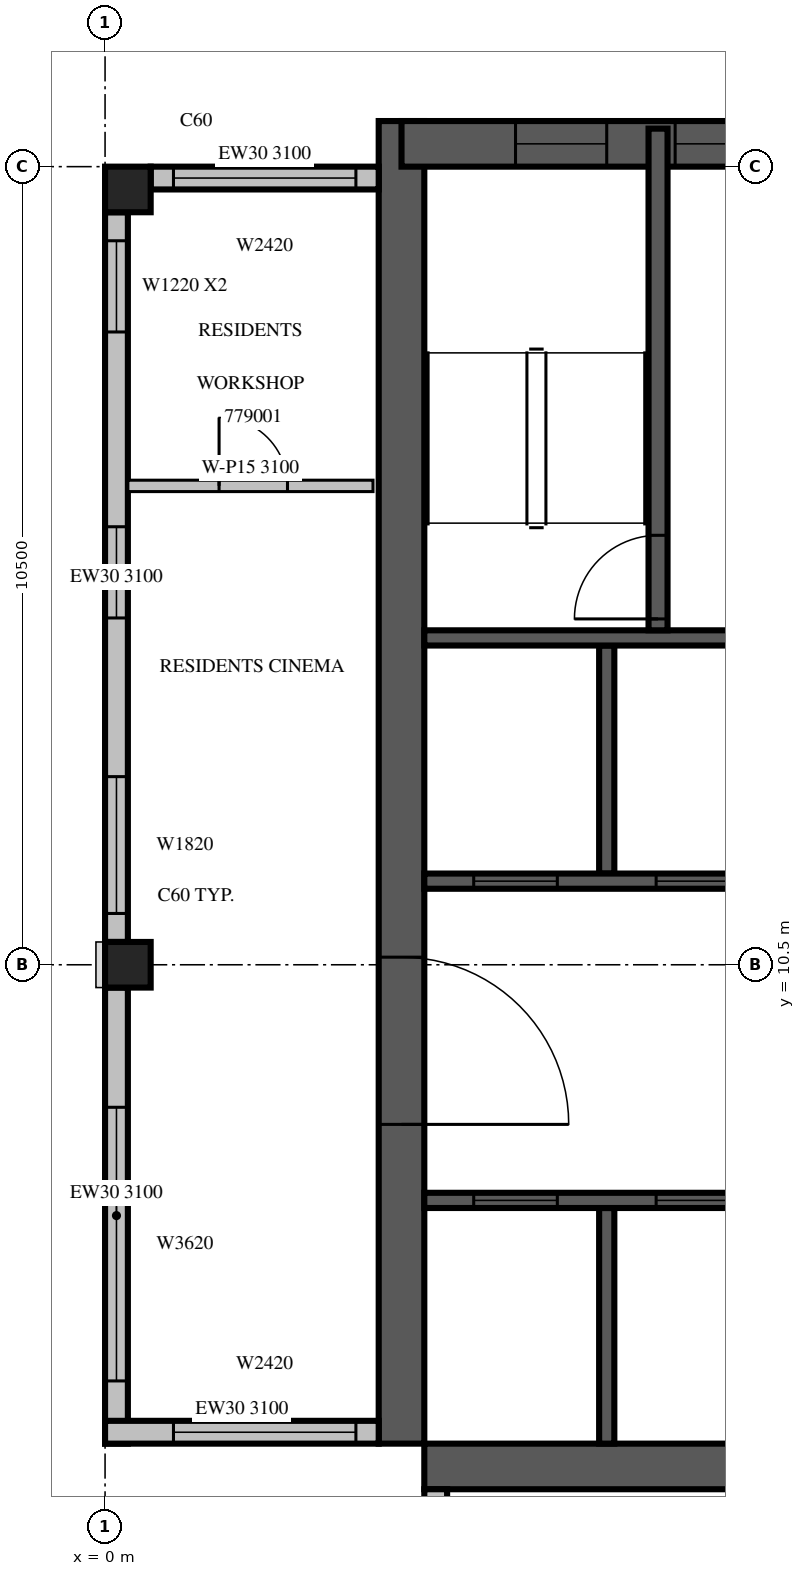
"""IFC4 building model, lengths in metres.
Left out: names, types, materials, properties, quantities, classifications, styles, units other than length and angle.
Written with IfcOpenShell. Run it as: python <this file> out.ifc"""

import sys

from ifc_helpers import new_model, si_unit, direction, frame, frame_2d, origin, origin_2d, place, context, subcontext, project, spatial, rectangle, extrude, source, transform, mapped, element, fill, save


model = new_model("IFC4")
c1 = context("Model", 3, precision=1e-05, world=origin(), true_north=direction((0.0, 1.0)))
c2 = subcontext(c1, "Body", "Model", "MODEL_VIEW")
j1 = project(units=[si_unit("LENGTHUNIT", "METRE"), si_unit("PLANEANGLEUNIT", "RADIAN")], contexts=[c1])
p1 = place(None, origin())
s1 = spatial("IfcSite", under=j1, at=p1, CompositionType="ELEMENT")
p2 = place(p1, origin())
s2 = spatial("IfcBuilding", under=s1, at=p2, CompositionType="ELEMENT")
p3 = place(p2, frame((0.0, 0.0, 337.0)))
s3 = spatial("IfcBuildingStorey", under=s2, at=p3, CompositionType="ELEMENT", Elevation=337.0)
m1 = source(origin(), c2, "Body", "SweptSolid", [
    extrude(rectangle(XDim=0.6, YDim=0.6, at=origin_2d()), origin(), (0.0, 0.0, 1.0), 3.5),
])
for number, where, z_axis, x_axis in (
    (1, (0.3, 10.5, 0.0), (0.0, 0.0, 1.0), (1.0, 0.0, 0.0)),
    (2, (0.3, 20.7, 0.0), (0.0, 0.0, 1.0), (1.0, 0.0, 0.0)),
):
    element("IfcColumn", number, at=place(p3, frame(where, z_axis=z_axis, x_axis=x_axis)), inside=s3, PredefinedType="COLUMN", context=c2, shape_type="MappedRepresentation", body=[
        mapped(m1, transform((0.0, 0.0, 0.0), scale=1.0)),
    ])
m2 = source(origin(), c2, "Body", "SweptSolid", [
    extrude(rectangle(XDim=17.4, YDim=0.6, at=frame_2d((8.7, 0.0))), origin(), (0.0, 0.0, 1.0), 3.5),
])
p4 = place(p3, frame((3.9, 4.2, 0.0), z_axis=(0.0, 0.0, 1.0), x_axis=(0.0, 1.0, 0.0)))
e3 = element("IfcWall", 3, at=p4, inside=s3, PredefinedType="SHEAR", context=c2, shape_type="MappedRepresentation", body=[
    mapped(m2, transform((0.0, 0.0, 0.0), scale=1.0)),
])
m3 = source(origin(), c2, "Body", "SweptSolid", [
    extrude(rectangle(XDim=2.2, YDim=2.1, at=frame_2d((1.1, 1.05))), frame((0.0, 0.31, 0.0), z_axis=(0.0, -1.0, 0.0), x_axis=(1.0, 0.0, 0.0)), (0.0, 0.0, 1.0), 0.62),
])
p5 = place(p4, frame((4.2, 0.0, 0.0)))
e4 = element("IfcOpeningElement", 4, at=p5, cuts=e3, PredefinedType="OPENING", context=c2, shape_type="MappedRepresentation", body=[
    mapped(m3, transform((0.0, 0.0, 0.0), scale=1.0)),
])
p6 = place(p3, frame((4.2, 3.9, 0.0), z_axis=(0.0, 0.0, 1.0), x_axis=(1.0, 0.0, 0.0)))
e5 = element("IfcWall", 5, at=p6, inside=s3, PredefinedType="SHEAR", context=c2, shape_type="MappedRepresentation", body=[
    mapped(m2, transform((0.0, 0.0, 0.0), scale=1.0)),
])
m4 = source(origin(), c2, "Body", "SweptSolid", [
    extrude(rectangle(XDim=0.9, YDim=2.1, at=frame_2d((0.45, 1.05))), frame((0.0, 0.31, 0.0), z_axis=(0.0, -1.0, 0.0), x_axis=(1.0, 0.0, 0.0)), (0.0, 0.0, 1.0), 0.62),
])
p7 = place(p6, frame((15.2, 0.0, 0.0)))
e6 = element("IfcOpeningElement", 6, at=p7, cuts=e5, PredefinedType="OPENING", context=c2, shape_type="MappedRepresentation", body=[
    mapped(m4, transform((0.0, 0.0, 0.0), scale=1.0)),
])
m5 = source(origin(), c2, "Body", "SweptSolid", [
    extrude(rectangle(XDim=6.6, YDim=0.6, at=frame_2d((3.3, 0.0))), origin(), (0.0, 0.0, 1.0), 3.5),
])
p8 = place(p3, frame((3.9, 21.3, 0.0), z_axis=(0.0, 0.0, 1.0), x_axis=(1.0, 0.0, 0.0)))
e7 = element("IfcWall", 7, at=p8, inside=s3, PredefinedType="SHEAR", context=c2, shape_type="MappedRepresentation", body=[
    mapped(m5, transform((0.0, 0.0, 0.0), scale=1.0)),
])
m6 = source(origin(), c2, "Body", "SweptSolid", [
    extrude(rectangle(XDim=1.2, YDim=2.4, at=frame_2d((0.6, 1.2))), frame((0.0, 0.31, 0.0), z_axis=(0.0, -1.0, 0.0), x_axis=(1.0, 0.0, 0.0)), (0.0, 0.0, 1.0), 0.62),
])
p9 = place(p8, frame((1.5, 0.0, 0.6)))
e8 = element("IfcOpeningElement", 8, at=p9, cuts=e7, PredefinedType="OPENING", context=c2, shape_type="MappedRepresentation", body=[
    mapped(m6, transform((0.0, 0.0, 0.0), scale=1.0)),
])
p10 = place(p8, frame((3.6, 0.0, 0.6)))
e9 = element("IfcOpeningElement", 9, at=p10, cuts=e7, PredefinedType="OPENING", context=c2, shape_type="MappedRepresentation", body=[
    mapped(m6, transform((0.0, 0.0, 0.0), scale=1.0)),
])
m7 = source(origin(), c2, "Body", "SweptSolid", [
    extrude(rectangle(XDim=3.0, YDim=0.3, at=frame_2d((1.5, 0.0))), origin(), (0.0, 0.0, 1.0), 3.1),
])
p11 = place(p3, frame((3.6, 20.85, 0.0), z_axis=(0.0, 0.0, 1.0), x_axis=(-1.0, 0.0, 0.0)))
e10 = element("IfcWall", 10, at=p11, inside=s3, PredefinedType="STANDARD", context=c2, shape_type="MappedRepresentation", body=[
    mapped(m7, transform((0.0, 0.0, 0.0), scale=1.0)),
])
m8 = source(origin(), c2, "Body", "SweptSolid", [
    extrude(rectangle(XDim=2.4, YDim=2.0, at=frame_2d((1.2, 1.0))), frame((0.0, 0.16, 0.0), z_axis=(0.0, -1.0, 0.0), x_axis=(1.0, 0.0, 0.0)), (0.0, 0.0, 1.0), 0.32),
])
p12 = place(p11, frame((0.3, 0.0, 0.6)))
e11 = element("IfcOpeningElement", 11, at=p12, cuts=e10, PredefinedType="OPENING", context=c2, shape_type="MappedRepresentation", body=[
    mapped(m8, transform((0.0, 0.0, 0.0), scale=1.0)),
])
m9 = source(origin(), c2, "Body", "SweptSolid", [
    extrude(rectangle(XDim=9.6, YDim=0.3, at=frame_2d((4.8, 0.0))), origin(), (0.0, 0.0, 1.0), 3.1),
])
p13 = place(p3, frame((0.15, 20.4, 0.0), z_axis=(0.0, 0.0, 1.0), x_axis=(0.0, -1.0, 0.0)))
e12 = element("IfcWall", 12, at=p13, inside=s3, PredefinedType="STANDARD", context=c2, shape_type="MappedRepresentation", body=[
    mapped(m9, transform((0.0, 0.0, 0.0), scale=1.0)),
])
m10 = source(origin(), c2, "Body", "SweptSolid", [
    extrude(rectangle(XDim=1.2, YDim=2.0, at=frame_2d((0.6, 1.0))), frame((0.0, 0.16, 0.0), z_axis=(0.0, -1.0, 0.0), x_axis=(1.0, 0.0, 0.0)), (0.0, 0.0, 1.0), 0.32),
])
p14 = place(p13, frame((0.375, 0.0, 0.6)))
e13 = element("IfcOpeningElement", 13, at=p14, cuts=e12, PredefinedType="OPENING", context=c2, shape_type="MappedRepresentation", body=[
    mapped(m10, transform((0.0, 0.0, 0.0), scale=1.0)),
])
m11 = source(origin(), c2, "Body", "SweptSolid", [
    extrude(rectangle(XDim=1.8, YDim=2.0, at=frame_2d((0.9, 1.0))), frame((0.0, 0.16, 0.0), z_axis=(0.0, -1.0, 0.0), x_axis=(1.0, 0.0, 0.0)), (0.0, 0.0, 1.0), 0.32),
])
p15 = place(p13, frame((7.425, 0.0, 0.6)))
e14 = element("IfcOpeningElement", 14, at=p15, cuts=e12, PredefinedType="OPENING", context=c2, shape_type="MappedRepresentation", body=[
    mapped(m11, transform((0.0, 0.0, 0.0), scale=1.0)),
])
p16 = place(p13, frame((4.138, 0.0, 0.6)))
e15 = element("IfcOpeningElement", 15, at=p16, cuts=e12, PredefinedType="OPENING", context=c2, shape_type="MappedRepresentation", body=[
    mapped(m10, transform((0.0, 0.0, 0.0), scale=1.0)),
])
m12 = source(origin(), c2, "Body", "SweptSolid", [
    extrude(rectangle(XDim=6.0, YDim=0.3, at=frame_2d((3.0, 0.0))), origin(), (0.0, 0.0, 1.0), 3.1),
])
p17 = place(p3, frame((0.15, 10.2, 0.0), z_axis=(0.0, 0.0, 1.0), x_axis=(0.0, -1.0, 0.0)))
e16 = element("IfcWall", 16, at=p17, inside=s3, PredefinedType="STANDARD", context=c2, shape_type="MappedRepresentation", body=[
    mapped(m12, transform((0.0, 0.0, 0.0), scale=1.0)),
])
m13 = source(origin(), c2, "Body", "SweptSolid", [
    extrude(rectangle(XDim=3.6, YDim=2.0, at=frame_2d((1.8, 1.0))), frame((0.0, 0.16, 0.0), z_axis=(0.0, -1.0, 0.0), x_axis=(1.0, 0.0, 0.0)), (0.0, 0.0, 1.0), 0.32),
])
p18 = place(p17, frame((1.575, 0.0, 0.6)))
e17 = element("IfcOpeningElement", 17, at=p18, cuts=e16, PredefinedType="OPENING", context=c2, shape_type="MappedRepresentation", body=[
    mapped(m13, transform((0.0, 0.0, 0.0), scale=1.0)),
])
m14 = source(origin(), c2, "Body", "SweptSolid", [
    extrude(rectangle(XDim=3.6, YDim=0.3, at=frame_2d((1.8, 0.0))), origin(), (0.0, 0.0, 1.0), 3.1),
])
p19 = place(p3, frame((0.0, 4.35, 0.0), z_axis=(0.0, 0.0, 1.0), x_axis=(1.0, 0.0, 0.0)))
e18 = element("IfcWall", 18, at=p19, inside=s3, PredefinedType="STANDARD", context=c2, shape_type="MappedRepresentation", body=[
    mapped(m14, transform((0.0, 0.0, 0.0), scale=1.0)),
])
p20 = place(p19, frame((0.9, 0.0, 0.6)))
e19 = element("IfcOpeningElement", 19, at=p20, cuts=e18, PredefinedType="OPENING", context=c2, shape_type="MappedRepresentation", body=[
    mapped(m8, transform((0.0, 0.0, 0.0), scale=1.0)),
])
p21 = place(p3, frame((4.35, 3.6, 0.0), z_axis=(0.0, 0.0, 1.0), x_axis=(0.0, -1.0, 0.0)))
e20 = element("IfcWall", 20, at=p21, inside=s3, PredefinedType="STANDARD", context=c2, shape_type="MappedRepresentation", body=[
    mapped(m14, transform((0.0, 0.0, 0.0), scale=1.0)),
])
p22 = place(p21, frame((0.3, 0.0, 0.6)))
e21 = element("IfcOpeningElement", 21, at=p22, cuts=e20, PredefinedType="OPENING", context=c2, shape_type="MappedRepresentation", body=[
    mapped(m8, transform((0.0, 0.0, 0.0), scale=1.0)),
])
m15 = source(origin(), c2, "Body", "SweptSolid", [
    extrude(rectangle(XDim=3.1, YDim=0.2, at=frame_2d((1.55, 0.0))), origin(), (0.0, 0.0, 1.0), 3.5),
])
p23 = place(p3, frame((6.6, 4.2, 0.0), z_axis=(0.0, 0.0, 1.0), x_axis=(0.0, 1.0, 0.0)))
e22 = element("IfcWall", 22, at=p23, inside=s3, PredefinedType="SOLIDWALL", context=c2, shape_type="MappedRepresentation", body=[
    mapped(m15, transform((0.0, 0.0, 0.0), scale=1.0)),
])
m16 = source(origin(), c2, "Body", "SweptSolid", [
    extrude(rectangle(XDim=3.0, YDim=0.2, at=frame_2d((1.5, 0.0))), origin(), (0.0, 0.0, 1.0), 3.5),
])
p24 = place(p3, frame((6.6, 11.7, 0.0), z_axis=(0.0, 0.0, 1.0), x_axis=(0.0, 1.0, 0.0)))
e23 = element("IfcWall", 23, at=p24, inside=s3, PredefinedType="SOLIDWALL", context=c2, shape_type="MappedRepresentation", body=[
    mapped(m16, transform((0.0, 0.0, 0.0), scale=1.0)),
])
m17 = source(origin(), c2, "Body", "SweptSolid", [
    extrude(rectangle(XDim=9.6, YDim=0.2, at=frame_2d((4.8, 0.0))), origin(), (0.0, 0.0, 1.0), 3.5),
])
p25 = place(p3, frame((4.2, 7.4, 0.0), z_axis=(0.0, 0.0, 1.0), x_axis=(1.0, 0.0, 0.0)))
e24 = element("IfcWall", 24, at=p25, inside=s3, PredefinedType="SOLIDWALL", context=c2, shape_type="MappedRepresentation", body=[
    mapped(m17, transform((0.0, 0.0, 0.0), scale=1.0)),
])
m18 = source(origin(), c2, "Body", "SweptSolid", [
    extrude(rectangle(XDim=1.1, YDim=2.1, at=frame_2d((0.55, 1.05))), frame((0.0, 0.11, 0.0), z_axis=(0.0, -1.0, 0.0), x_axis=(1.0, 0.0, 0.0)), (0.0, 0.0, 1.0), 0.22),
])
p26 = place(p25, frame((0.65, 0.0, 0.0)))
e25 = element("IfcOpeningElement", 25, at=p26, cuts=e24, PredefinedType="OPENING", context=c2, shape_type="MappedRepresentation", body=[
    mapped(m18, transform((0.0, 0.0, 0.0), scale=1.0)),
])
p27 = place(p25, frame((3.05, 0.0, 0.0)))
e26 = element("IfcOpeningElement", 26, at=p27, cuts=e24, PredefinedType="OPENING", context=c2, shape_type="MappedRepresentation", body=[
    mapped(m18, transform((0.0, 0.0, 0.0), scale=1.0)),
])
p28 = place(p25, frame((5.45, 0.0, 0.0)))
e27 = element("IfcOpeningElement", 27, at=p28, cuts=e24, PredefinedType="OPENING", context=c2, shape_type="MappedRepresentation", body=[
    mapped(m18, transform((0.0, 0.0, 0.0), scale=1.0)),
])
p29 = place(p25, frame((7.85, 0.0, 0.0)))
e28 = element("IfcOpeningElement", 28, at=p29, cuts=e24, PredefinedType="OPENING", context=c2, shape_type="MappedRepresentation", body=[
    mapped(m18, transform((0.0, 0.0, 0.0), scale=1.0)),
])
m19 = source(origin(), c2, "Body", "SweptSolid", [
    extrude(rectangle(XDim=4.8, YDim=0.2, at=frame_2d((2.4, 0.0))), origin(), (0.0, 0.0, 1.0), 3.5),
])
p30 = place(p3, frame((4.2, 11.6, 0.0), z_axis=(0.0, 0.0, 1.0), x_axis=(1.0, 0.0, 0.0)))
e29 = element("IfcWall", 29, at=p30, inside=s3, PredefinedType="SOLIDWALL", context=c2, shape_type="MappedRepresentation", body=[
    mapped(m19, transform((0.0, 0.0, 0.0), scale=1.0)),
])
p31 = place(p30, frame((0.65, 0.0, 0.0)))
e30 = element("IfcOpeningElement", 30, at=p31, cuts=e29, PredefinedType="OPENING", context=c2, shape_type="MappedRepresentation", body=[
    mapped(m18, transform((0.0, 0.0, 0.0), scale=1.0)),
])
p32 = place(p30, frame((3.05, 0.0, 0.0)))
e31 = element("IfcOpeningElement", 31, at=p32, cuts=e29, PredefinedType="OPENING", context=c2, shape_type="MappedRepresentation", body=[
    mapped(m18, transform((0.0, 0.0, 0.0), scale=1.0)),
])
p33 = place(p3, frame((4.2, 14.8, 0.0), z_axis=(0.0, 0.0, 1.0), x_axis=(1.0, 0.0, 0.0)))
e32 = element("IfcWall", 32, at=p33, inside=s3, PredefinedType="SOLIDWALL", context=c2, shape_type="MappedRepresentation", body=[
    mapped(m19, transform((0.0, 0.0, 0.0), scale=1.0)),
])
m20 = source(origin(), c2, "Body", "SweptSolid", [
    extrude(rectangle(XDim=6.6, YDim=0.25, at=frame_2d((3.3, 0.0))), origin(), (0.0, 0.0, 1.0), 3.1),
])
p34 = place(p3, frame((7.275, 14.9, 0.0), z_axis=(0.0, 0.0, 1.0), x_axis=(0.0, 1.0, 0.0)))
e33 = element("IfcWall", 33, at=p34, inside=s3, PredefinedType="SOLIDWALL", context=c2, shape_type="MappedRepresentation", body=[
    mapped(m20, transform((0.0, 0.0, 0.0), scale=1.0)),
])
m21 = source(origin(), c2, "Body", "SweptSolid", [
    extrude(rectangle(XDim=1.1, YDim=2.1, at=frame_2d((0.55, 1.05))), frame((0.0, 0.135, 0.0), z_axis=(0.0, -1.0, 0.0), x_axis=(1.0, 0.0, 0.0)), (0.0, 0.0, 1.0), 0.27),
])
p35 = place(p34, frame((0.15, 0.0, 0.0)))
e34 = element("IfcOpeningElement", 34, at=p35, cuts=e33, PredefinedType="OPENING", context=c2, shape_type="MappedRepresentation", body=[
    mapped(m21, transform((0.0, 0.0, 0.0), scale=1.0)),
])
m22 = source(origin(), c2, "Body", "SweptSolid", [
    extrude(rectangle(XDim=3.225, YDim=0.15, at=frame_2d((1.613, 0.0))), origin(), (0.0, 0.0, 1.0), 3.1),
])
p36 = place(p3, frame((0.3, 16.8, 0.0), z_axis=(0.0, 0.0, 1.0), x_axis=(1.0, 0.0, 0.0)))
e35 = element("IfcWall", 35, at=p36, inside=s3, PredefinedType="PARTITIONING", context=c2, shape_type="MappedRepresentation", body=[
    mapped(m22, transform((0.0, 0.0, 0.0), scale=1.0)),
])
m23 = source(origin(), c2, "Body", "SweptSolid", [
    extrude(rectangle(XDim=0.9, YDim=2.1, at=frame_2d((0.45, 1.05))), frame((0.0, 0.085, 0.0), z_axis=(0.0, -1.0, 0.0), x_axis=(1.0, 0.0, 0.0)), (0.0, 0.0, 1.0), 0.17),
])
p37 = place(p36, frame((1.2, 0.0, 0.0)))
e36 = element("IfcOpeningElement", 36, at=p37, cuts=e35, PredefinedType="OPENING", context=c2, shape_type="MappedRepresentation", body=[
    mapped(m23, transform((0.0, 0.0, 0.0), scale=1.0)),
])
m24 = source(origin(), c2, "Body", "SweptSolid", [
    extrude(rectangle(XDim=2.4, YDim=2.0, at=frame_2d((1.2, 1.0))), frame((0.0, 0.03, 0.0), z_axis=(0.0, -1.0, 0.0), x_axis=(1.0, 0.0, 0.0)), (0.0, 0.0, 1.0), 0.06),
])
p38 = place(p12, origin())
e37 = element("IfcWindow", 37, at=p38, inside=s3, PartitioningType="SINGLE_PANEL", PredefinedType="WINDOW", context=c2, shape_type="MappedRepresentation", body=[
    mapped(m24, transform((0.0, 0.0, 0.0), scale=1.0)),
])
fill(e11, e37)
m25 = source(origin(), c2, "Body", "SweptSolid", [
    extrude(rectangle(XDim=1.2, YDim=2.0, at=frame_2d((0.6, 1.0))), frame((0.0, 0.03, 0.0), z_axis=(0.0, -1.0, 0.0), x_axis=(1.0, 0.0, 0.0)), (0.0, 0.0, 1.0), 0.06),
])
p39 = place(p14, origin())
e38 = element("IfcWindow", 38, at=p39, inside=s3, PartitioningType="SINGLE_PANEL", PredefinedType="WINDOW", context=c2, shape_type="MappedRepresentation", body=[
    mapped(m25, transform((0.0, 0.0, 0.0), scale=1.0)),
])
fill(e13, e38)
m26 = source(origin(), c2, "Body", "SweptSolid", [
    extrude(rectangle(XDim=1.8, YDim=2.0, at=frame_2d((0.9, 1.0))), frame((0.0, 0.03, 0.0), z_axis=(0.0, -1.0, 0.0), x_axis=(1.0, 0.0, 0.0)), (0.0, 0.0, 1.0), 0.06),
])
p40 = place(p15, origin())
e39 = element("IfcWindow", 39, at=p40, inside=s3, PartitioningType="SINGLE_PANEL", PredefinedType="WINDOW", context=c2, shape_type="MappedRepresentation", body=[
    mapped(m26, transform((0.0, 0.0, 0.0), scale=1.0)),
])
fill(e14, e39)
m27 = source(origin(), c2, "Body", "SweptSolid", [
    extrude(rectangle(XDim=3.6, YDim=2.0, at=frame_2d((1.8, 1.0))), frame((0.0, 0.03, 0.0), z_axis=(0.0, -1.0, 0.0), x_axis=(1.0, 0.0, 0.0)), (0.0, 0.0, 1.0), 0.06),
])
p41 = place(p18, origin())
e40 = element("IfcWindow", 40, at=p41, inside=s3, PartitioningType="SINGLE_PANEL", PredefinedType="WINDOW", context=c2, shape_type="MappedRepresentation", body=[
    mapped(m27, transform((0.0, 0.0, 0.0), scale=1.0)),
])
fill(e17, e40)
p42 = place(p16, origin())
e41 = element("IfcWindow", 41, at=p42, inside=s3, PartitioningType="SINGLE_PANEL", PredefinedType="WINDOW", context=c2, shape_type="MappedRepresentation", body=[
    mapped(m25, transform((0.0, 0.0, 0.0), scale=1.0)),
])
fill(e15, e41)
p43 = place(p20, origin())
e42 = element("IfcWindow", 42, at=p43, inside=s3, PartitioningType="SINGLE_PANEL", PredefinedType="WINDOW", context=c2, shape_type="MappedRepresentation", body=[
    mapped(m24, transform((0.0, 0.0, 0.0), scale=1.0)),
])
fill(e19, e42)
m28 = source(origin(), c2, "Body", "SweptSolid", [
    extrude(rectangle(XDim=1.1, YDim=2.1, at=frame_2d((0.55, 1.05))), frame((0.0, 0.025, 0.0), z_axis=(0.0, -1.0, 0.0), x_axis=(1.0, 0.0, 0.0)), (0.0, 0.0, 1.0), 0.05),
])
p44 = place(p26, origin())
e43 = element("IfcDoor", 43, at=p44, inside=s3, OperationType="SLIDING_TO_LEFT", PredefinedType="DOOR", context=c2, shape_type="MappedRepresentation", body=[
    mapped(m28, transform((0.0, 0.0, 0.0), scale=1.0)),
])
fill(e25, e43)
p45 = place(p27, origin())
e44 = element("IfcDoor", 44, at=p45, inside=s3, OperationType="SLIDING_TO_LEFT", PredefinedType="DOOR", context=c2, shape_type="MappedRepresentation", body=[
    mapped(m28, transform((0.0, 0.0, 0.0), scale=1.0)),
])
fill(e26, e44)
p46 = place(p31, origin())
e45 = element("IfcDoor", 45, at=p46, inside=s3, OperationType="SLIDING_TO_LEFT", PredefinedType="DOOR", context=c2, shape_type="MappedRepresentation", body=[
    mapped(m28, transform((0.0, 0.0, 0.0), scale=1.0)),
])
fill(e30, e45)
p47 = place(p32, origin())
e46 = element("IfcDoor", 46, at=p47, inside=s3, OperationType="SLIDING_TO_LEFT", PredefinedType="DOOR", context=c2, shape_type="MappedRepresentation", body=[
    mapped(m28, transform((0.0, 0.0, 0.0), scale=1.0)),
])
fill(e31, e46)
p48 = place(p35, origin())
e47 = element("IfcDoor", 47, at=p48, inside=s3, OperationType="SINGLE_SWING_LEFT", PredefinedType="DOOR", context=c2, shape_type="MappedRepresentation", body=[
    mapped(m28, transform((0.0, 0.0, 0.0), scale=1.0)),
])
fill(e34, e47)
m29 = source(origin(), c2, "Body", "SweptSolid", [
    extrude(rectangle(XDim=2.2, YDim=2.1, at=frame_2d((1.1, 1.05))), frame((0.0, 0.025, 0.0), z_axis=(0.0, -1.0, 0.0), x_axis=(1.0, 0.0, 0.0)), (0.0, 0.0, 1.0), 0.05),
])
p49 = place(p5, origin())
e48 = element("IfcDoor", 48, at=p49, inside=s3, OperationType="DOUBLE_DOOR_SINGLE_SWING", PredefinedType="DOOR", context=c2, shape_type="MappedRepresentation", body=[
    mapped(m29, transform((0.0, 0.0, 0.0), scale=1.0)),
])
fill(e4, e48)
m30 = source(origin(), c2, "Body", "SweptSolid", [
    extrude(rectangle(XDim=1.2, YDim=2.4, at=frame_2d((0.6, 1.2))), frame((0.0, 0.03, 0.0), z_axis=(0.0, -1.0, 0.0), x_axis=(1.0, 0.0, 0.0)), (0.0, 0.0, 1.0), 0.06),
])
p50 = place(p9, origin())
e49 = element("IfcWindow", 49, at=p50, inside=s3, PartitioningType="SINGLE_PANEL", PredefinedType="WINDOW", context=c2, shape_type="MappedRepresentation", body=[
    mapped(m30, transform((0.0, 0.0, 0.0), scale=1.0)),
])
fill(e8, e49)
p51 = place(p10, origin())
e50 = element("IfcWindow", 50, at=p51, inside=s3, PartitioningType="SINGLE_PANEL", PredefinedType="WINDOW", context=c2, shape_type="MappedRepresentation", body=[
    mapped(m30, transform((0.0, 0.0, 0.0), scale=1.0)),
])
fill(e9, e50)
m31 = source(origin(), c2, "Body", "SweptSolid", [
    extrude(rectangle(XDim=0.9, YDim=2.1, at=frame_2d((0.45, 1.05))), frame((0.0, 0.025, 0.0), z_axis=(0.0, -1.0, 0.0), x_axis=(1.0, 0.0, 0.0)), (0.0, 0.0, 1.0), 0.05),
])
p52 = place(p37, origin())
e51 = element("IfcDoor", 51, at=p52, inside=s3, OperationType="SINGLE_SWING_LEFT", PredefinedType="DOOR", context=c2, shape_type="MappedRepresentation", body=[
    mapped(m31, transform((0.0, 0.0, 0.0), scale=1.0)),
])
fill(e36, e51)
save(model, sys.argv[1])
